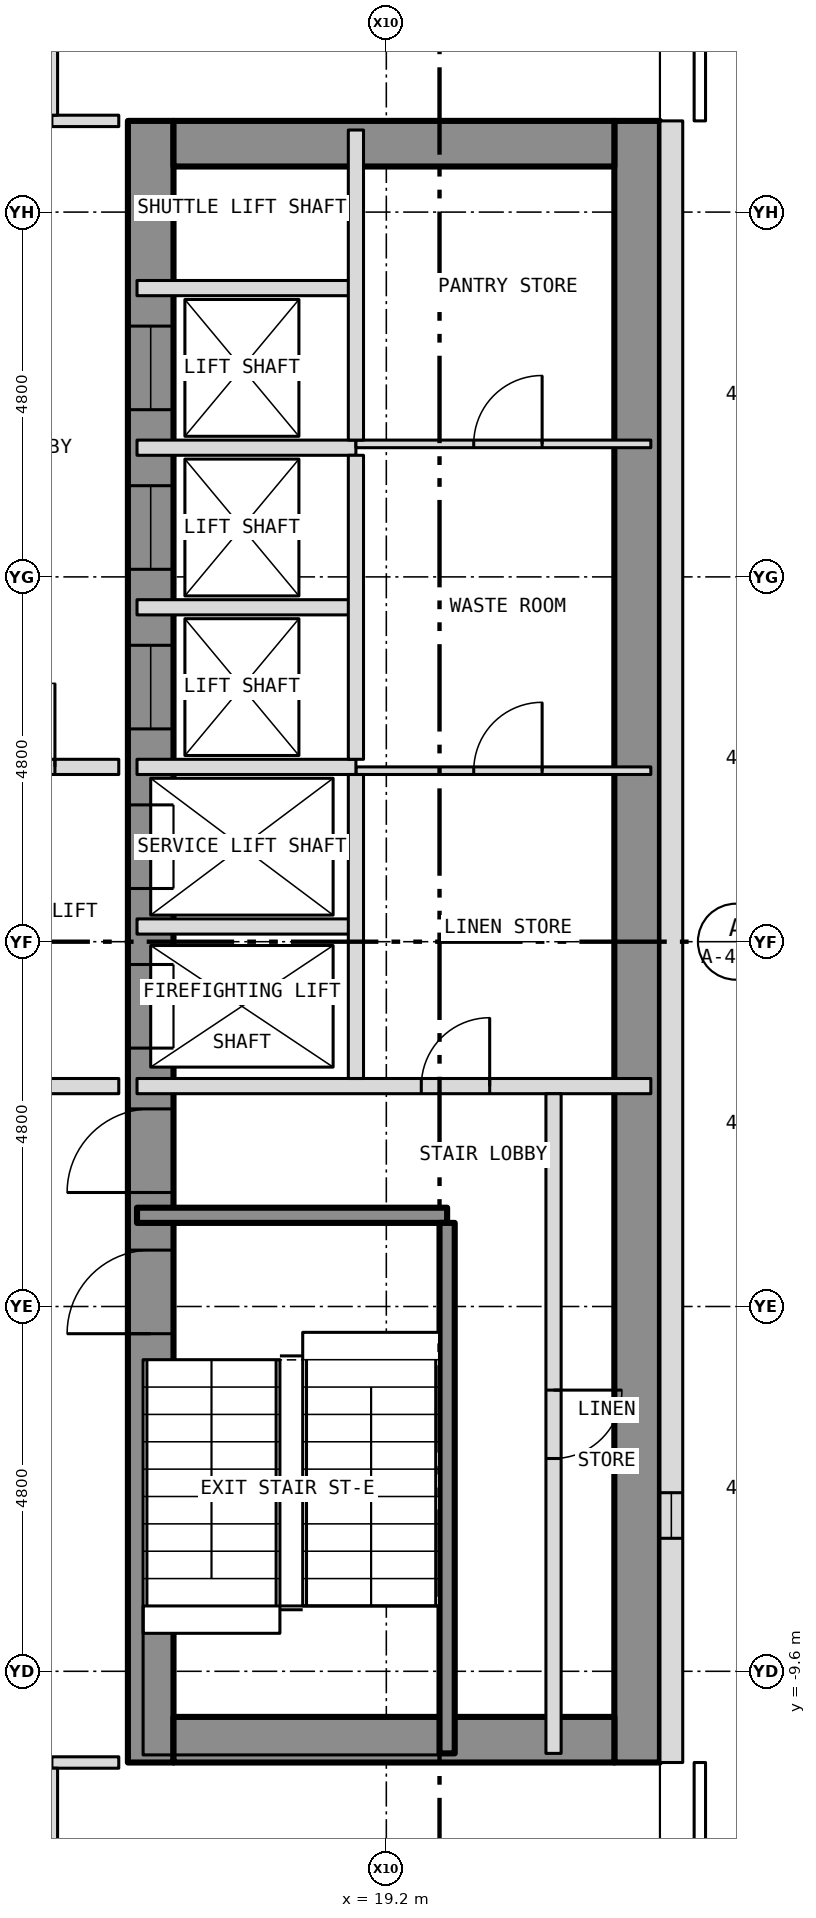
"""IFC4 building model, lengths in metres.
Left out: names, types, materials, properties, quantities, classifications, styles, units other than length and angle.
Written with IfcOpenShell. Run it as: python <this file> out.ifc"""

import sys

from ifc_helpers import new_model, si_unit, direction, frame, frame_2d, origin, place, context, subcontext, project, spatial, rectangle, extrude, element, fill, save


model = new_model("IFC4")
c1 = context("Model", 3, precision=1e-05, world=origin(), true_north=direction((0.0, 1.0)))
c2 = subcontext(c1, "Body", "Model", "MODEL_VIEW")
j1 = project(units=[si_unit("LENGTHUNIT", "METRE"), si_unit("PLANEANGLEUNIT", "RADIAN")], contexts=[c1])
p1 = place(None, origin())
s1 = spatial("IfcSite", under=j1, at=p1, CompositionType="ELEMENT")
p2 = place(p1, origin())
s2 = spatial("IfcBuilding", under=s1, at=p2, CompositionType="ELEMENT")
p3 = place(p2, frame((0.0, 0.0, 103.0)))
s3 = spatial("IfcBuildingStorey", under=s2, at=p3, CompositionType="ELEMENT", Elevation=103.0)
p4 = place(p3, frame((16.1, -10.8, 0.0), z_axis=(0.0, 0.0, 1.0), x_axis=(0.0, 1.0, 0.0)))
e1 = element("IfcWall", 1, at=p4, inside=s3, PredefinedType="SHEAR", context=c2, shape_type="SweptSolid", body=[
    extrude(rectangle(XDim=21.6, YDim=0.6, at=frame_2d((10.8, 0.0))), origin(), (0.0, 0.0, 1.0), 3.25),
])
p5 = place(p4, frame((9.4, 0.0, 0.0)))
e2 = element("IfcOpeningElement", 2, at=p5, cuts=e1, PredefinedType="OPENING", context=c2, shape_type="SweptSolid", body=[
    extrude(rectangle(XDim=1.1, YDim=2.1, at=frame_2d((0.55, 1.05))), frame((0.0, 0.312, 0.0), z_axis=(0.0, -1.0, 0.0), x_axis=(1.0, 0.0, 0.0)), (0.0, 0.0, 1.0), 0.624),
])
p6 = place(p4, frame((11.5, 0.0, 0.0)))
e3 = element("IfcOpeningElement", 3, at=p6, cuts=e1, PredefinedType="OPENING", context=c2, shape_type="SweptSolid", body=[
    extrude(rectangle(XDim=1.1, YDim=2.1, at=frame_2d((0.55, 1.05))), frame((0.0, 0.312, 0.0), z_axis=(0.0, -1.0, 0.0), x_axis=(1.0, 0.0, 0.0)), (0.0, 0.0, 1.0), 0.624),
])
p7 = place(p4, frame((13.6, 0.0, 0.0)))
e4 = element("IfcOpeningElement", 4, at=p7, cuts=e1, PredefinedType="OPENING", context=c2, shape_type="SweptSolid", body=[
    extrude(rectangle(XDim=1.1, YDim=2.1, at=frame_2d((0.55, 1.05))), frame((0.0, 0.312, 0.0), z_axis=(0.0, -1.0, 0.0), x_axis=(1.0, 0.0, 0.0)), (0.0, 0.0, 1.0), 0.624),
])
p8 = place(p4, frame((15.7, 0.0, 0.0)))
e5 = element("IfcOpeningElement", 5, at=p8, cuts=e1, PredefinedType="OPENING", context=c2, shape_type="SweptSolid", body=[
    extrude(rectangle(XDim=1.1, YDim=2.1, at=frame_2d((0.55, 1.05))), frame((0.0, 0.312, 0.0), z_axis=(0.0, -1.0, 0.0), x_axis=(1.0, 0.0, 0.0)), (0.0, 0.0, 1.0), 0.624),
])
p9 = place(p4, frame((17.8, 0.0, 0.0)))
e6 = element("IfcOpeningElement", 6, at=p9, cuts=e1, PredefinedType="OPENING", context=c2, shape_type="SweptSolid", body=[
    extrude(rectangle(XDim=1.1, YDim=2.1, at=frame_2d((0.55, 1.05))), frame((0.0, 0.312, 0.0), z_axis=(0.0, -1.0, 0.0), x_axis=(1.0, 0.0, 0.0)), (0.0, 0.0, 1.0), 0.624),
])
p10 = place(p4, frame((5.642, 0.0, 0.0)))
e7 = element("IfcOpeningElement", 7, at=p10, cuts=e1, PredefinedType="OPENING", context=c2, shape_type="SweptSolid", body=[
    extrude(rectangle(XDim=1.1, YDim=2.1, at=frame_2d((0.55, 1.05))), frame((0.0, 0.312, 0.0), z_axis=(0.0, -1.0, 0.0), x_axis=(1.0, 0.0, 0.0)), (0.0, 0.0, 1.0), 0.624),
])
p11 = place(p4, frame((7.5, 0.0, 0.0)))
e8 = element("IfcOpeningElement", 8, at=p11, cuts=e1, PredefinedType="OPENING", context=c2, shape_type="SweptSolid", body=[
    extrude(rectangle(XDim=1.1, YDim=2.1, at=frame_2d((0.55, 1.05))), frame((0.0, 0.312, 0.0), z_axis=(0.0, -1.0, 0.0), x_axis=(1.0, 0.0, 0.0)), (0.0, 0.0, 1.0), 0.624),
])
p12 = place(p3, frame((22.5, -10.8, 0.0), z_axis=(0.0, 0.0, 1.0), x_axis=(0.0, 1.0, 0.0)))
e9 = element("IfcWall", 9, at=p12, inside=s3, PredefinedType="SHEAR", context=c2, shape_type="SweptSolid", body=[
    extrude(rectangle(XDim=21.6, YDim=0.6, at=frame_2d((10.8, 0.0))), origin(), (0.0, 0.0, 1.0), 3.25),
])
for number, where, z_axis, x_axis in (
    (10, (16.4, 10.5, 0.0), (0.0, 0.0, 1.0), (1.0, 0.0, 0.0)),
    (11, (16.4, -10.5, 0.0), (0.0, 0.0, 1.0), (1.0, 0.0, 0.0)),
):
    element("IfcWall", number, at=place(p3, frame(where, z_axis=z_axis, x_axis=x_axis)), inside=s3, PredefinedType="SHEAR", context=c2, shape_type="SweptSolid", body=[
        extrude(rectangle(XDim=5.8, YDim=0.6, at=frame_2d((2.9, 0.0))), origin(), (0.0, 0.0, 1.0), 3.25),
    ])
p13 = place(p3, frame((22.95, -10.8, 0.0), z_axis=(0.0, 0.0, 1.0), x_axis=(0.0, 1.0, 0.0)))
e12 = element("IfcWall", 12, at=p13, inside=s3, PredefinedType="SOLIDWALL", context=c2, shape_type="SweptSolid", body=[
    extrude(rectangle(XDim=21.6, YDim=0.3, at=frame_2d((10.8, 0.0))), origin(), (0.0, 0.0, 1.0), 3.5),
])
p14 = place(p13, frame((2.95, 0.0, 1.0)))
e13 = element("IfcOpeningElement", 13, at=p14, cuts=e12, PredefinedType="OPENING", context=c2, shape_type="SweptSolid", body=[
    extrude(rectangle(XDim=0.6, YDim=1.5, at=frame_2d((0.3, 0.75))), frame((0.0, 0.162, 0.0), z_axis=(0.0, -1.0, 0.0), x_axis=(1.0, 0.0, 0.0)), (0.0, 0.0, 1.0), 0.324),
])
p15 = place(p3, frame((14.8, -10.8, 0.0), z_axis=(0.0, 0.0, 1.0), x_axis=(1.0, 0.0, 0.0)))
e14 = element("IfcWall", 14, at=p15, inside=s3, PredefinedType="PARTITIONING", context=c2, shape_type="SweptSolid", body=[
    extrude(rectangle(XDim=0.88, YDim=0.15, at=frame_2d((0.44, 0.0))), origin(), (0.0, 0.0, 1.0), 3.35),
])
p16 = place(p3, frame((15.92, -3.6, 0.0), z_axis=(0.0, 0.0, 1.0), x_axis=(1.0, 0.0, 0.0)))
e15 = element("IfcWall", 15, at=p16, inside=s3, PredefinedType="SHEAR", context=c2, shape_type="SweptSolid", body=[
    extrude(rectangle(XDim=4.08, YDim=0.2, at=frame_2d((2.04, 0.0))), origin(), (0.0, 0.0, 1.0), 3.25),
])
p17 = place(p3, frame((12.4, -1.9, 0.0), z_axis=(0.0, 0.0, 1.0), x_axis=(1.0, 0.0, 0.0)))
e16 = element("IfcWall", 16, at=p17, inside=s3, PredefinedType="PARTITIONING", context=c2, shape_type="SweptSolid", body=[
    extrude(rectangle(XDim=3.28, YDim=0.2, at=frame_2d((1.64, 0.0))), origin(), (0.0, 0.0, 1.0), 3.35),
])
p18 = place(p17, frame((1.24, 0.0, 0.0)))
e17 = element("IfcOpeningElement", 17, at=p18, cuts=e16, PredefinedType="OPENING", context=c2, shape_type="SweptSolid", body=[
    extrude(rectangle(XDim=1.1, YDim=2.1, at=frame_2d((0.55, 1.05))), frame((0.0, 0.112, 0.0), z_axis=(0.0, -1.0, 0.0), x_axis=(1.0, 0.0, 0.0)), (0.0, 0.0, 1.0), 0.224),
])
p19 = place(p3, frame((15.92, -1.9, 0.0), z_axis=(0.0, 0.0, 1.0), x_axis=(1.0, 0.0, 0.0)))
e18 = element("IfcWall", 18, at=p19, inside=s3, PredefinedType="PARTITIONING", context=c2, shape_type="SweptSolid", body=[
    extrude(rectangle(XDim=6.76, YDim=0.2, at=frame_2d((3.38, 0.0))), origin(), (0.0, 0.0, 1.0), 3.25),
])
p20 = place(p19, frame((3.74, 0.0, 0.0)))
e19 = element("IfcOpeningElement", 19, at=p20, cuts=e18, PredefinedType="OPENING", context=c2, shape_type="SweptSolid", body=[
    extrude(rectangle(XDim=0.9, YDim=2.1, at=frame_2d((0.45, 1.05))), frame((0.0, 0.112, 0.0), z_axis=(0.0, -1.0, 0.0), x_axis=(1.0, 0.0, 0.0)), (0.0, 0.0, 1.0), 0.224),
])
p21 = place(p3, frame((15.92, 0.2, 0.0), z_axis=(0.0, 0.0, 1.0), x_axis=(1.0, 0.0, 0.0)))
e20 = element("IfcWall", 20, at=p21, inside=s3, PredefinedType="PARTITIONING", context=c2, shape_type="SweptSolid", body=[
    extrude(rectangle(XDim=2.88, YDim=0.2, at=frame_2d((1.44, 0.0))), origin(), (0.0, 0.0, 1.0), 3.25),
])
p22 = place(p3, frame((18.8, 2.25, 0.0), z_axis=(0.0, 0.0, 1.0), x_axis=(1.0, 0.0, 0.0)))
e21 = element("IfcWall", 21, at=p22, inside=s3, PredefinedType="PARTITIONING", context=c2, shape_type="SweptSolid", body=[
    extrude(rectangle(XDim=3.88, YDim=0.1, at=frame_2d((1.94, 0.0))), origin(), (0.0, 0.0, 1.0), 3.25),
])
p23 = place(p22, frame((1.55, 0.0, 0.0)))
e22 = element("IfcOpeningElement", 22, at=p23, cuts=e21, PredefinedType="OPENING", context=c2, shape_type="SweptSolid", body=[
    extrude(rectangle(XDim=0.9, YDim=2.1, at=frame_2d((0.45, 1.05))), frame((0.0, 0.062, 0.0), z_axis=(0.0, -1.0, 0.0), x_axis=(1.0, 0.0, 0.0)), (0.0, 0.0, 1.0), 0.124),
])
p24 = place(p3, frame((12.4, 2.3, 0.0), z_axis=(0.0, 0.0, 1.0), x_axis=(1.0, 0.0, 0.0)))
e23 = element("IfcWall", 23, at=p24, inside=s3, PredefinedType="PARTITIONING", context=c2, shape_type="SweptSolid", body=[
    extrude(rectangle(XDim=3.28, YDim=0.2, at=frame_2d((1.64, 0.0))), origin(), (0.0, 0.0, 1.0), 3.35),
])
p25 = place(p24, frame((1.34, 0.0, 0.0)))
e24 = element("IfcOpeningElement", 24, at=p25, cuts=e23, PredefinedType="OPENING", context=c2, shape_type="SweptSolid", body=[
    extrude(rectangle(XDim=1.1, YDim=2.1, at=frame_2d((0.55, 1.05))), frame((0.0, 0.112, 0.0), z_axis=(0.0, -1.0, 0.0), x_axis=(1.0, 0.0, 0.0)), (0.0, 0.0, 1.0), 0.224),
])
for number, where, z_axis, x_axis in (
    (25, (15.92, 2.3, 0.0), (0.0, 0.0, 1.0), (1.0, 0.0, 0.0)),
    (26, (15.92, 4.4, 0.0), (0.0, 0.0, 1.0), (1.0, 0.0, 0.0)),
    (27, (15.92, 6.5, 0.0), (0.0, 0.0, 1.0), (1.0, 0.0, 0.0)),
):
    element("IfcWall", number, at=place(p3, frame(where, z_axis=z_axis, x_axis=x_axis)), inside=s3, PredefinedType="PARTITIONING", context=c2, shape_type="SweptSolid", body=[
        extrude(rectangle(XDim=2.88, YDim=0.2, at=frame_2d((1.44, 0.0))), origin(), (0.0, 0.0, 1.0), 3.25),
    ])
p26 = place(p3, frame((18.8, 6.55, 0.0), z_axis=(0.0, 0.0, 1.0), x_axis=(1.0, 0.0, 0.0)))
e28 = element("IfcWall", 28, at=p26, inside=s3, PredefinedType="PARTITIONING", context=c2, shape_type="SweptSolid", body=[
    extrude(rectangle(XDim=3.88, YDim=0.1, at=frame_2d((1.94, 0.0))), origin(), (0.0, 0.0, 1.0), 3.25),
])
p27 = place(p26, frame((1.55, 0.0, 0.0)))
e29 = element("IfcOpeningElement", 29, at=p27, cuts=e28, PredefinedType="OPENING", context=c2, shape_type="SweptSolid", body=[
    extrude(rectangle(XDim=0.9, YDim=2.1, at=frame_2d((0.45, 1.05))), frame((0.0, 0.062, 0.0), z_axis=(0.0, -1.0, 0.0), x_axis=(1.0, 0.0, 0.0)), (0.0, 0.0, 1.0), 0.124),
])
p28 = place(p3, frame((15.92, 8.6, 0.0), z_axis=(0.0, 0.0, 1.0), x_axis=(1.0, 0.0, 0.0)))
e30 = element("IfcWall", 30, at=p28, inside=s3, PredefinedType="PARTITIONING", context=c2, shape_type="SweptSolid", body=[
    extrude(rectangle(XDim=2.88, YDim=0.2, at=frame_2d((1.44, 0.0))), origin(), (0.0, 0.0, 1.0), 3.25),
])
p29 = place(p3, frame((14.8, 10.8, 0.0), z_axis=(0.0, 0.0, 1.0), x_axis=(1.0, 0.0, 0.0)))
e31 = element("IfcWall", 31, at=p29, inside=s3, PredefinedType="PARTITIONING", context=c2, shape_type="SweptSolid", body=[
    extrude(rectangle(XDim=0.88, YDim=0.15, at=frame_2d((0.44, 0.0))), origin(), (0.0, 0.0, 1.0), 3.35),
])
p30 = place(p3, frame((14.8, -14.725, 0.0), z_axis=(0.0, 0.0, 1.0), x_axis=(0.0, 1.0, 0.0)))
e32 = element("IfcWall", 32, at=p30, inside=s3, PredefinedType="PARTITIONING", context=c2, shape_type="SweptSolid", body=[
    extrude(rectangle(XDim=3.85, YDim=0.15, at=frame_2d((1.925, 0.0))), origin(), (0.0, 0.0, 1.0), 3.35),
])
p31 = place(p30, frame((0.525, 0.0, 0.0)))
e33 = element("IfcOpeningElement", 33, at=p31, cuts=e32, PredefinedType="OPENING", context=c2, shape_type="SweptSolid", body=[
    extrude(rectangle(XDim=1.0, YDim=2.1, at=frame_2d((0.5, 1.05))), frame((0.0, 0.087, 0.0), z_axis=(0.0, -1.0, 0.0), x_axis=(1.0, 0.0, 0.0)), (0.0, 0.0, 1.0), 0.174),
])
p32 = place(p3, frame((14.8, 10.875, 0.0), z_axis=(0.0, 0.0, 1.0), x_axis=(0.0, 1.0, 0.0)))
e34 = element("IfcWall", 34, at=p32, inside=s3, PredefinedType="PARTITIONING", context=c2, shape_type="SweptSolid", body=[
    extrude(rectangle(XDim=3.85, YDim=0.15, at=frame_2d((1.925, 0.0))), origin(), (0.0, 0.0, 1.0), 3.35),
])
p33 = place(p32, frame((2.325, 0.0, 0.0)))
e35 = element("IfcOpeningElement", 35, at=p33, cuts=e34, PredefinedType="OPENING", context=c2, shape_type="SweptSolid", body=[
    extrude(rectangle(XDim=1.0, YDim=2.1, at=frame_2d((0.5, 1.05))), frame((0.0, 0.087, 0.0), z_axis=(0.0, -1.0, 0.0), x_axis=(1.0, 0.0, 0.0)), (0.0, 0.0, 1.0), 0.174),
])
for number, where, z_axis, x_axis in (
    (36, (18.8, -1.8, 0.0), (0.0, 0.0, 1.0), (0.0, 1.0, 0.0)),
    (37, (18.8, 2.4, 0.0), (0.0, 0.0, 1.0), (0.0, 1.0, 0.0)),
):
    element("IfcWall", number, at=place(p3, frame(where, z_axis=z_axis, x_axis=x_axis)), inside=s3, PredefinedType="PARTITIONING", context=c2, shape_type="SweptSolid", body=[
        extrude(rectangle(XDim=4.0, YDim=0.2, at=frame_2d((2.0, 0.0))), origin(), (0.0, 0.0, 1.0), 3.25),
    ])
p34 = place(p3, frame((18.8, 6.6, 0.0), z_axis=(0.0, 0.0, 1.0), x_axis=(0.0, 1.0, 0.0)))
e38 = element("IfcWall", 38, at=p34, inside=s3, PredefinedType="PARTITIONING", context=c2, shape_type="SweptSolid", body=[
    extrude(rectangle(XDim=4.08, YDim=0.2, at=frame_2d((2.04, 0.0))), origin(), (0.0, 0.0, 1.0), 3.25),
])
p35 = place(p3, frame((20.0, -10.68, 0.0), z_axis=(0.0, 0.0, 1.0), x_axis=(0.0, 1.0, 0.0)))
e39 = element("IfcWall", 39, at=p35, inside=s3, PredefinedType="SHEAR", context=c2, shape_type="SweptSolid", body=[
    extrude(rectangle(XDim=6.98, YDim=0.2, at=frame_2d((3.49, 0.0))), origin(), (0.0, 0.0, 1.0), 3.25),
])
p36 = place(p3, frame((21.4, -10.68, 0.0), z_axis=(0.0, 0.0, 1.0), x_axis=(0.0, 1.0, 0.0)))
e40 = element("IfcWall", 40, at=p36, inside=s3, PredefinedType="PARTITIONING", context=c2, shape_type="SweptSolid", body=[
    extrude(rectangle(XDim=8.68, YDim=0.2, at=frame_2d((4.34, 0.0))), origin(), (0.0, 0.0, 1.0), 3.25),
])
p37 = place(p36, frame((3.88, 0.0, 0.0)))
e41 = element("IfcOpeningElement", 41, at=p37, cuts=e40, PredefinedType="OPENING", context=c2, shape_type="SweptSolid", body=[
    extrude(rectangle(XDim=0.9, YDim=2.1, at=frame_2d((0.45, 1.05))), frame((0.0, 0.112, 0.0), z_axis=(0.0, -1.0, 0.0), x_axis=(1.0, 0.0, 0.0)), (0.0, 0.0, 1.0), 0.224),
])
p38 = place(p14, origin())
e42 = element("IfcWindow", 42, at=p38, inside=s3, PartitioningType="SINGLE_PANEL", PredefinedType="WINDOW", context=c2, shape_type="SweptSolid", body=[
    extrude(rectangle(XDim=0.6, YDim=1.5, at=frame_2d((0.3, 0.75))), frame((0.0, -0.06, 0.0), z_axis=(0.0, -1.0, 0.0), x_axis=(1.0, 0.0, 0.0)), (0.0, 0.0, 1.0), 0.06),
])
fill(e13, e42)
p39 = place(p5, origin())
e43 = element("IfcDoor", 43, at=p39, inside=s3, OperationType="SLIDING_TO_LEFT", PredefinedType="DOOR", context=c2, shape_type="SweptSolid", body=[
    extrude(rectangle(XDim=1.1, YDim=2.1, at=frame_2d((0.55, 1.05))), frame((0.0, 0.025, 0.0), z_axis=(0.0, -1.0, 0.0), x_axis=(1.0, 0.0, 0.0)), (0.0, 0.0, 1.0), 0.05),
])
fill(e2, e43)
p40 = place(p6, origin())
e44 = element("IfcDoor", 44, at=p40, inside=s3, OperationType="SLIDING_TO_LEFT", PredefinedType="DOOR", context=c2, shape_type="SweptSolid", body=[
    extrude(rectangle(XDim=1.1, YDim=2.1, at=frame_2d((0.55, 1.05))), frame((0.0, 0.025, 0.0), z_axis=(0.0, -1.0, 0.0), x_axis=(1.0, 0.0, 0.0)), (0.0, 0.0, 1.0), 0.05),
])
fill(e3, e44)
p41 = place(p7, origin())
e45 = element("IfcDoor", 45, at=p41, inside=s3, OperationType="SLIDING_TO_LEFT", PredefinedType="DOOR", context=c2, shape_type="SweptSolid", body=[
    extrude(rectangle(XDim=1.1, YDim=2.1, at=frame_2d((0.55, 1.05))), frame((0.0, 0.025, 0.0), z_axis=(0.0, -1.0, 0.0), x_axis=(1.0, 0.0, 0.0)), (0.0, 0.0, 1.0), 0.05),
])
fill(e4, e45)
p42 = place(p8, origin())
e46 = element("IfcDoor", 46, at=p42, inside=s3, OperationType="SLIDING_TO_LEFT", PredefinedType="DOOR", context=c2, shape_type="SweptSolid", body=[
    extrude(rectangle(XDim=1.1, YDim=2.1, at=frame_2d((0.55, 1.05))), frame((0.0, 0.025, 0.0), z_axis=(0.0, -1.0, 0.0), x_axis=(1.0, 0.0, 0.0)), (0.0, 0.0, 1.0), 0.05),
])
fill(e5, e46)
p43 = place(p9, origin())
e47 = element("IfcDoor", 47, at=p43, inside=s3, OperationType="SLIDING_TO_LEFT", PredefinedType="DOOR", context=c2, shape_type="SweptSolid", body=[
    extrude(rectangle(XDim=1.1, YDim=2.1, at=frame_2d((0.55, 1.05))), frame((0.0, 0.025, 0.0), z_axis=(0.0, -1.0, 0.0), x_axis=(1.0, 0.0, 0.0)), (0.0, 0.0, 1.0), 0.05),
])
fill(e6, e47)
p44 = place(p10, origin())
e48 = element("IfcDoor", 48, at=p44, inside=s3, OperationType="SINGLE_SWING_LEFT", PredefinedType="DOOR", context=c2, shape_type="SweptSolid", body=[
    extrude(rectangle(XDim=1.1, YDim=2.1, at=frame_2d((0.55, 1.05))), frame((0.0, 0.025, 0.0), z_axis=(0.0, -1.0, 0.0), x_axis=(1.0, 0.0, 0.0)), (0.0, 0.0, 1.0), 0.05),
])
fill(e7, e48)
p45 = place(p11, origin())
e49 = element("IfcDoor", 49, at=p45, inside=s3, OperationType="SINGLE_SWING_LEFT", PredefinedType="DOOR", context=c2, shape_type="SweptSolid", body=[
    extrude(rectangle(XDim=1.1, YDim=2.1, at=frame_2d((0.55, 1.05))), frame((0.0, 0.025, 0.0), z_axis=(0.0, -1.0, 0.0), x_axis=(1.0, 0.0, 0.0)), (0.0, 0.0, 1.0), 0.05),
])
fill(e8, e49)
p46 = place(p37, origin())
e50 = element("IfcDoor", 50, at=p46, inside=s3, OperationType="SINGLE_SWING_RIGHT", PredefinedType="DOOR", context=c2, shape_type="SweptSolid", body=[
    extrude(rectangle(XDim=0.9, YDim=2.1, at=frame_2d((0.45, 1.05))), frame((0.0, 0.025, 0.0), z_axis=(0.0, -1.0, 0.0), x_axis=(1.0, 0.0, 0.0)), (0.0, 0.0, 1.0), 0.05),
])
fill(e41, e50)
p47 = place(p20, origin())
e51 = element("IfcDoor", 51, at=p47, inside=s3, OperationType="SINGLE_SWING_RIGHT", PredefinedType="DOOR", context=c2, shape_type="SweptSolid", body=[
    extrude(rectangle(XDim=0.9, YDim=2.1, at=frame_2d((0.45, 1.05))), frame((0.0, 0.025, 0.0), z_axis=(0.0, -1.0, 0.0), x_axis=(1.0, 0.0, 0.0)), (0.0, 0.0, 1.0), 0.05),
])
fill(e19, e51)
p48 = place(p23, origin())
e52 = element("IfcDoor", 52, at=p48, inside=s3, OperationType="SINGLE_SWING_RIGHT", PredefinedType="DOOR", context=c2, shape_type="SweptSolid", body=[
    extrude(rectangle(XDim=0.9, YDim=2.1, at=frame_2d((0.45, 1.05))), frame((0.0, 0.025, 0.0), z_axis=(0.0, -1.0, 0.0), x_axis=(1.0, 0.0, 0.0)), (0.0, 0.0, 1.0), 0.05),
])
fill(e22, e52)
p49 = place(p27, origin())
e53 = element("IfcDoor", 53, at=p49, inside=s3, OperationType="SINGLE_SWING_RIGHT", PredefinedType="DOOR", context=c2, shape_type="SweptSolid", body=[
    extrude(rectangle(XDim=0.9, YDim=2.1, at=frame_2d((0.45, 1.05))), frame((0.0, 0.025, 0.0), z_axis=(0.0, -1.0, 0.0), x_axis=(1.0, 0.0, 0.0)), (0.0, 0.0, 1.0), 0.05),
])
fill(e29, e53)
p50 = place(p25, origin())
e54 = element("IfcDoor", 54, at=p50, inside=s3, OperationType="SINGLE_SWING_RIGHT", PredefinedType="DOOR", context=c2, shape_type="SweptSolid", body=[
    extrude(rectangle(XDim=1.1, YDim=2.1, at=frame_2d((0.55, 1.05))), frame((0.0, 0.025, 0.0), z_axis=(0.0, -1.0, 0.0), x_axis=(1.0, 0.0, 0.0)), (0.0, 0.0, 1.0), 0.05),
])
fill(e24, e54)
save(model, sys.argv[1])
